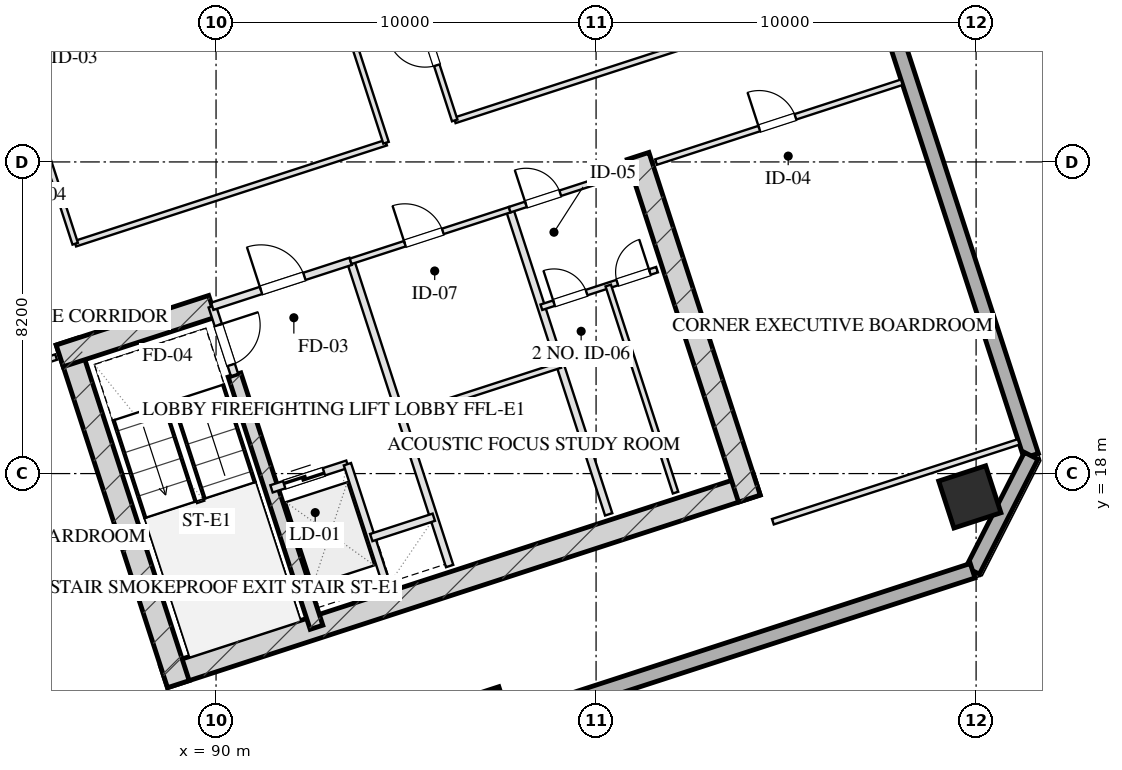
"""IFC4 building model, lengths in metres.
Left out: names, types, materials, properties, quantities, classifications, styles, units other than length and angle.
Written with IfcOpenShell. Run it as: python <this file> out.ifc"""

import sys

from ifc_helpers import new_model, si_unit, direction, frame, frame_2d, origin, origin_2d, place, context, subcontext, project, spatial, rectangle, hollow_rectangle, extrude, element, fill, save


model = new_model("IFC4")
c1 = context("Model", 3, precision=1e-05, world=origin(), true_north=direction((0.0, 1.0)))
c2 = subcontext(c1, "Body", "Model", "MODEL_VIEW")
j1 = project(units=[si_unit("LENGTHUNIT", "METRE"), si_unit("PLANEANGLEUNIT", "RADIAN")], contexts=[c1])
p1 = place(None, origin())
s1 = spatial("IfcSite", under=j1, at=p1, CompositionType="ELEMENT")
p2 = place(p1, origin())
s2 = spatial("IfcBuilding", under=s1, at=p2, CompositionType="ELEMENT")
p3 = place(p2, frame((0.0, 0.0, 166.75)))
s3 = spatial("IfcBuildingStorey", under=s2, at=p3, CompositionType="ELEMENT", Elevation=166.75)
p4 = place(p3, frame((88.63, 12.652, 0.0), z_axis=(0.0, 0.0, 1.0), x_axis=(0.95105714907, 0.309015046886, 0.0)))
e1 = element("IfcWall", 1, at=p4, inside=s3, PredefinedType="SHEAR", context=c2, shape_type="SweptSolid", body=[
    extrude(rectangle(XDim=16.4, YDim=0.6, at=frame_2d((8.2, 0.0))), origin(), (0.0, 0.0, 1.0), 3.45),
])
p5 = place(p3, frame((86.078, 21.475, 0.0), z_axis=(0.0, 0.0, 1.0), x_axis=(0.309017938678, -0.951056209472, 0.0)))
e2 = element("IfcWall", 2, at=p5, inside=s3, PredefinedType="SHEAR", context=c2, shape_type="SweptSolid", body=[
    extrude(rectangle(XDim=9.48, YDim=0.6, at=frame_2d((4.74, 0.0))), origin(), (0.0, 0.0, 1.0), 3.45),
])
p6 = place(p3, frame((101.105, 26.358, 0.0), z_axis=(0.0, 0.0, 1.0), x_axis=(0.309010370028, -0.95105866865, 0.0)))
e3 = element("IfcWall", 3, at=p6, inside=s3, PredefinedType="SHEAR", context=c2, shape_type="SweptSolid", body=[
    extrude(rectangle(XDim=9.48, YDim=0.6, at=frame_2d((4.74, 0.0))), origin(), (0.0, 0.0, 1.0), 3.45),
])
p7 = place(p3, frame((90.486, 20.594, 0.0), z_axis=(0.0, 0.0, 1.0), x_axis=(0.309020428229, -0.951055400562, 0.0)))
e4 = element("IfcWall", 4, at=p7, inside=s3, PredefinedType="SHEAR", context=c2, shape_type="SweptSolid", body=[
    extrude(rectangle(XDim=6.98, YDim=0.35, at=frame_2d((3.49, 0.0))), origin(), (0.0, 0.0, 1.0), 3.45),
])
p8 = place(p3, frame((85.886, 21.097, 0.0), z_axis=(0.0, 0.0, 1.0), x_axis=(0.951068073652, 0.308981422225, 0.0)))
e5 = element("IfcWall", 5, at=p8, inside=s3, PredefinedType="SHEAR", context=c2, shape_type="SweptSolid", body=[
    extrude(rectangle(XDim=4.22, YDim=0.6, at=frame_2d((2.11, 0.0))), origin(), (0.0, 0.0, 1.0), 3.45),
])
p9 = place(p3, frame((109.835, 17.386, 0.0), z_axis=(0.0, 0.0, 1.0), x_axis=(0.951056516295, 0.309016994375, 0.0)))
e6 = element("IfcColumn", 6, at=p9, inside=s3, PredefinedType="COLUMN", context=c2, shape_type="SweptSolid", body=[
    extrude(hollow_rectangle(XDim=1.3, YDim=1.3, WallThickness=0.045, at=origin_2d()), origin(), (0.0, 0.0, 1.0), 3.451),
])
p10 = place(p3, frame((97.185, 11.888, 0.0), z_axis=(0.0, 0.0, 1.0), x_axis=(0.951056516295, 0.309016994375, 0.0)))
e7 = element("IfcColumn", 7, at=p10, inside=s3, PredefinedType="COLUMN", context=c2, shape_type="SweptSolid", body=[
    extrude(hollow_rectangle(XDim=0.8, YDim=0.8, WallThickness=0.028, at=origin_2d()), origin(), (0.0, 0.0, 1.0), 3.451),
])
p11 = place(p3, frame((98.224, 59.173, 0.0), z_axis=(0.0, 0.0, 1.0), x_axis=(0.309014228706, -0.951057414911, 0.0)))
e8 = element("IfcWall", 8, at=p11, inside=s3, PredefinedType="SOLIDWALL", context=c2, shape_type="SweptSolid", body=[
    extrude(rectangle(XDim=42.8, YDim=0.4, at=frame_2d((21.4, 0.0))), origin(), (0.0, 0.0, 1.0), 2.61),
])
p12 = place(p11, frame((17.675, 0.0, 0.75)))
e9 = element("IfcOpeningElement", 9, at=p12, cuts=e8, PredefinedType="OPENING", context=c2, shape_type="SweptSolid", body=[
    extrude(rectangle(XDim=2.25, YDim=1.46, at=frame_2d((1.125, 0.73))), frame((0.0, 0.21, 0.0), z_axis=(0.0, -1.0, 0.0), x_axis=(1.0, 0.0, 0.0)), (0.0, 0.0, 1.0), 0.42),
])
p13 = place(p11, frame((13.875, 0.0, 0.75)))
e10 = element("IfcOpeningElement", 10, at=p13, cuts=e8, PredefinedType="OPENING", context=c2, shape_type="SweptSolid", body=[
    extrude(rectangle(XDim=2.25, YDim=1.46, at=frame_2d((1.125, 0.73))), frame((0.0, 0.21, 0.0), z_axis=(0.0, -1.0, 0.0), x_axis=(1.0, 0.0, 0.0)), (0.0, 0.0, 1.0), 0.42),
])
p14 = place(p11, frame((26.784, 0.0, 0.0)))
e11 = element("IfcOpeningElement", 11, at=p14, cuts=e8, PredefinedType="OPENING", context=c2, shape_type="SweptSolid", body=[
    extrude(rectangle(XDim=1.1, YDim=2.15, at=frame_2d((0.55, 1.075))), frame((0.0, 0.21, 0.0), z_axis=(0.0, -1.0, 0.0), x_axis=(1.0, 0.0, 0.0)), (0.0, 0.0, 1.0), 0.42),
])
p15 = place(p3, frame((111.449, 18.468, 0.0), z_axis=(0.0, 0.0, 1.0), x_axis=(-0.454019523198, -0.890991735402, 0.0)))
e12 = element("IfcWall", 12, at=p15, inside=s3, PredefinedType="SOLIDWALL", context=c2, shape_type="SweptSolid", body=[
    extrude(rectangle(XDim=3.394, YDim=0.4, at=frame_2d((1.697, 0.0))), origin(), (0.0, 0.0, 1.0), 2.61),
])
p16 = place(p3, frame((109.908, 15.444, 0.0), z_axis=(0.0, 0.0, 1.0), x_axis=(-0.951057580055, -0.30901372044, 0.0)))
e13 = element("IfcWall", 13, at=p16, inside=s3, PredefinedType="SOLIDWALL", context=c2, shape_type="SweptSolid", body=[
    extrude(rectangle(XDim=26.4, YDim=0.4, at=frame_2d((13.2, 0.0))), origin(), (0.0, 0.0, 1.0), 2.61),
])
p17 = place(p3, frame((89.899, 22.401, 0.0), z_axis=(0.0, 0.0, 1.0), x_axis=(0.308932062672, -0.951084108086, 0.0)))
e14 = element("IfcWall", 14, at=p17, inside=s3, PredefinedType="PARTITIONING", context=c2, shape_type="SweptSolid", body=[
    extrude(rectangle(XDim=1.9, YDim=0.2, at=frame_2d((0.95, 0.0))), origin(), (0.0, 0.0, 1.0), 3.175),
])
p18 = place(p17, frame((0.52, 0.0, 0.0)))
e15 = element("IfcOpeningElement", 15, at=p18, cuts=e14, PredefinedType="OPENING", context=c2, shape_type="SweptSolid", body=[
    extrude(rectangle(XDim=1.1, YDim=2.05, at=frame_2d((0.55, 1.025))), frame((0.0, 0.11, 0.0), z_axis=(0.0, -1.0, 0.0), x_axis=(1.0, 0.0, 0.0)), (0.0, 0.0, 1.0), 0.22),
])
p19 = place(p3, frame((93.542, 23.585, 0.0), z_axis=(0.0, 0.0, 1.0), x_axis=(0.309042196757, -0.951048327176, 0.0)))
e16 = element("IfcWall", 16, at=p19, inside=s3, PredefinedType="PARTITIONING", context=c2, shape_type="SweptSolid", body=[
    extrude(rectangle(XDim=8.43, YDim=0.2, at=frame_2d((4.215, 0.0))), origin(), (0.0, 0.0, 1.0), 3.175),
])
p20 = place(p3, frame((89.899, 22.401, 0.0), z_axis=(0.0, 0.0, 1.0), x_axis=(0.951046716504, 0.309047153403, 0.0)))
e17 = element("IfcWall", 17, at=p20, inside=s3, PredefinedType="PARTITIONING", context=c2, shape_type="SweptSolid", body=[
    extrude(rectangle(XDim=3.83, YDim=0.2, at=frame_2d((1.915, 0.0))), origin(), (0.0, 0.0, 1.0), 3.175),
])
p21 = place(p20, frame((1.35, 0.0, 0.0)))
e18 = element("IfcOpeningElement", 18, at=p21, cuts=e17, PredefinedType="OPENING", context=c2, shape_type="SweptSolid", body=[
    extrude(rectangle(XDim=1.2, YDim=2.05, at=frame_2d((0.6, 1.025))), frame((0.0, 0.11, 0.0), z_axis=(0.0, -1.0, 0.0), x_axis=(1.0, 0.0, 0.0)), (0.0, 0.0, 1.0), 0.22),
])
p22 = place(p3, frame((91.46, 17.598, 0.0), z_axis=(0.0, 0.0, 1.0), x_axis=(0.951062257173, 0.308999325213, 0.0)))
e19 = element("IfcWall", 19, at=p22, inside=s3, PredefinedType="PARTITIONING", context=c2, shape_type="SweptSolid", body=[
    extrude(rectangle(XDim=2.1, YDim=0.2, at=frame_2d((1.05, 0.0))), origin(), (0.0, 0.0, 1.0), 3.175),
])
p23 = place(p22, frame((0.35, 0.0, 0.0)))
e20 = element("IfcOpeningElement", 20, at=p23, cuts=e19, PredefinedType="OPENING", context=c2, shape_type="SweptSolid", body=[
    extrude(rectangle(XDim=1.1, YDim=2.05, at=frame_2d((0.55, 1.025))), frame((0.0, 0.11, 0.0), z_axis=(0.0, -1.0, 0.0), x_axis=(1.0, 0.0, 0.0)), (0.0, 0.0, 1.0), 0.22),
])
p24 = place(p3, frame((93.457, 18.247, 0.0), z_axis=(0.0, 0.0, 1.0), x_axis=(0.3089935693, -0.951064127245, 0.0)))
e21 = element("IfcWall", 21, at=p24, inside=s3, PredefinedType="PARTITIONING", context=c2, shape_type="SweptSolid", body=[
    extrude(rectangle(XDim=3.7, YDim=0.2, at=frame_2d((1.85, 0.0))), origin(), (0.0, 0.0, 1.0), 3.175),
])
p25 = place(p3, frame((94.084, 16.317, 0.0), z_axis=(0.0, 0.0, 1.0), x_axis=(0.951041328149, 0.309063734775, 0.0)))
e22 = element("IfcWall", 22, at=p25, inside=s3, PredefinedType="PARTITIONING", context=c2, shape_type="SweptSolid", body=[
    extrude(rectangle(XDim=1.73, YDim=0.2, at=frame_2d((0.865, 0.0))), origin(), (0.0, 0.0, 1.0), 3.175),
])
p26 = place(p3, frame((97.727, 24.944, 0.0), z_axis=(0.0, 0.0, 1.0), x_axis=(0.309016001439, -0.951056838919, 0.0)))
e23 = element("IfcWall", 23, at=p26, inside=s3, PredefinedType="PARTITIONING", context=c2, shape_type="SweptSolid", body=[
    extrude(rectangle(XDim=8.43, YDim=0.2, at=frame_2d((4.215, 0.0))), origin(), (0.0, 0.0, 1.0), 3.175),
])
p27 = place(p3, frame((93.542, 23.585, 0.0), z_axis=(0.0, 0.0, 1.0), x_axis=(0.951063829732, 0.308994485023, 0.0)))
e24 = element("IfcWall", 24, at=p27, inside=s3, PredefinedType="PARTITIONING", context=c2, shape_type="SweptSolid", body=[
    extrude(rectangle(XDim=4.4, YDim=0.15, at=frame_2d((2.2, 0.0))), origin(), (0.0, 0.0, 1.0), 3.175),
])
p28 = place(p27, frame((1.5, 0.0, 0.0)))
e25 = element("IfcOpeningElement", 25, at=p28, cuts=e24, PredefinedType="OPENING", context=c2, shape_type="SweptSolid", body=[
    extrude(rectangle(XDim=1.05, YDim=2.05, at=frame_2d((0.525, 1.025))), frame((0.0, 0.085, 0.0), z_axis=(0.0, -1.0, 0.0), x_axis=(1.0, 0.0, 0.0)), (0.0, 0.0, 1.0), 0.17),
])
p29 = place(p3, frame((94.871, 19.495, 0.0), z_axis=(0.0, 0.0, 1.0), x_axis=(0.951042223598, 0.309060979314, 0.0)))
e26 = element("IfcWall", 26, at=p29, inside=s3, PredefinedType="PARTITIONING", context=c2, shape_type="SweptSolid", body=[
    extrude(rectangle(XDim=4.4, YDim=0.15, at=frame_2d((2.2, 0.0))), origin(), (0.0, 0.0, 1.0), 3.175),
])
p30 = place(p3, frame((97.727, 24.944, 0.0), z_axis=(0.0, 0.0, 1.0), x_axis=(0.951036872128, 0.309077446369, 0.0)))
e27 = element("IfcWall", 27, at=p30, inside=s3, PredefinedType="PARTITIONING", context=c2, shape_type="SweptSolid", body=[
    extrude(rectangle(XDim=3.2, YDim=0.15, at=frame_2d((1.6, 0.0))), origin(), (0.0, 0.0, 1.0), 3.175),
])
p31 = place(p30, frame((0.45, 0.0, 0.0)))
e28 = element("IfcOpeningElement", 28, at=p31, cuts=e27, PredefinedType="OPENING", context=c2, shape_type="SweptSolid", body=[
    extrude(rectangle(XDim=0.95, YDim=2.05, at=frame_2d((0.475, 1.025))), frame((0.0, 0.085, 0.0), z_axis=(0.0, -1.0, 0.0), x_axis=(1.0, 0.0, 0.0)), (0.0, 0.0, 1.0), 0.17),
])
p32 = place(p3, frame((98.561, 22.376, 0.0), z_axis=(0.0, 0.0, 1.0), x_axis=(0.95104415986, 0.309055020985, 0.0)))
e29 = element("IfcWall", 29, at=p32, inside=s3, PredefinedType="PARTITIONING", context=c2, shape_type="SweptSolid", body=[
    extrude(rectangle(XDim=3.2, YDim=0.15, at=frame_2d((1.6, 0.0))), origin(), (0.0, 0.0, 1.0), 3.175),
])
p33 = place(p32, frame((0.35, 0.0, 0.0)))
e30 = element("IfcOpeningElement", 30, at=p33, cuts=e29, PredefinedType="OPENING", context=c2, shape_type="SweptSolid", body=[
    extrude(rectangle(XDim=0.9, YDim=2.05, at=frame_2d((0.45, 1.025))), frame((0.0, 0.085, 0.0), z_axis=(0.0, -1.0, 0.0), x_axis=(1.0, 0.0, 0.0)), (0.0, 0.0, 1.0), 0.17),
])
p34 = place(p32, frame((2.1, 0.0, 0.0)))
e31 = element("IfcOpeningElement", 31, at=p34, cuts=e29, PredefinedType="OPENING", context=c2, shape_type="SweptSolid", body=[
    extrude(rectangle(XDim=0.9, YDim=2.05, at=frame_2d((0.45, 1.025))), frame((0.0, 0.085, 0.0), z_axis=(0.0, -1.0, 0.0), x_axis=(1.0, 0.0, 0.0)), (0.0, 0.0, 1.0), 0.17),
])
p35 = place(p3, frame((100.32, 22.948, 0.0), z_axis=(0.0, 0.0, 1.0), x_axis=(0.309035009867, -0.951050662518, 0.0)))
e32 = element("IfcWall", 32, at=p35, inside=s3, PredefinedType="PARTITIONING", context=c2, shape_type="SweptSolid", body=[
    extrude(rectangle(XDim=5.73, YDim=0.15, at=frame_2d((2.865, 0.0))), origin(), (0.0, 0.0, 1.0), 3.175),
])
p36 = place(p3, frame((78.753, 18.78, 0.0), z_axis=(0.0, 0.0, 1.0), x_axis=(0.951060977215, 0.309003264738, 0.0)))
e33 = element("IfcWall", 33, at=p36, inside=s3, PredefinedType="PARTITIONING", context=c2, shape_type="SweptSolid", body=[
    extrude(rectangle(XDim=7.4, YDim=0.15, at=frame_2d((3.7, 0.0))), origin(), (0.0, 0.0, 1.0), 3.175),
])
p37 = place(p36, frame((3.108, 0.0, 0.0)))
e34 = element("IfcOpeningElement", 34, at=p37, cuts=e33, PredefinedType="OPENING", context=c2, shape_type="SweptSolid", body=[
    extrude(rectangle(XDim=1.0, YDim=2.05, at=frame_2d((0.5, 1.025))), frame((0.0, 0.085, 0.0), z_axis=(0.0, -1.0, 0.0), x_axis=(1.0, 0.0, 0.0)), (0.0, 0.0, 1.0), 0.17),
])
p38 = place(p3, frame((104.653, 16.733, 0.0), z_axis=(0.0, 0.0, 1.0), x_axis=(0.951054383043, 0.309023559774, 0.0)))
e35 = element("IfcWall", 35, at=p38, inside=s3, PredefinedType="PARTITIONING", context=c2, shape_type="SweptSolid", body=[
    extrude(rectangle(XDim=6.8, YDim=0.15, at=frame_2d((3.4, 0.0))), origin(), (0.0, 0.0, 1.0), 3.175),
])
p39 = place(p3, frame((101.578, 26.196, 0.0), z_axis=(0.0, 0.0, 1.0), x_axis=(0.951064934653, 0.308991084134, 0.0)))
e36 = element("IfcWall", 36, at=p39, inside=s3, PredefinedType="PARTITIONING", context=c2, shape_type="SweptSolid", body=[
    extrude(rectangle(XDim=6.8, YDim=0.15, at=frame_2d((3.4, 0.0))), origin(), (0.0, 0.0, 1.0), 3.175),
])
p40 = place(p39, frame((2.856, 0.0, 0.0)))
e37 = element("IfcOpeningElement", 37, at=p40, cuts=e36, PredefinedType="OPENING", context=c2, shape_type="SweptSolid", body=[
    extrude(rectangle(XDim=1.0, YDim=2.05, at=frame_2d((0.5, 1.025))), frame((0.0, 0.085, 0.0), z_axis=(0.0, -1.0, 0.0), x_axis=(1.0, 0.0, 0.0)), (0.0, 0.0, 1.0), 0.17),
])
p41 = place(p3, frame((86.294, 24.048, 0.0), z_axis=(0.0, 0.0, 1.0), x_axis=(0.951052008164, 0.309030868631, 0.0)))
e38 = element("IfcWall", 38, at=p41, inside=s3, PredefinedType="PARTITIONING", context=c2, shape_type="SweptSolid", body=[
    extrude(rectangle(XDim=8.6, YDim=0.15, at=frame_2d((4.3, 0.0))), origin(), (0.0, 0.0, 1.0), 3.175),
])
p42 = place(p3, frame((96.28, 27.292, 0.0), z_axis=(0.0, 0.0, 1.0), x_axis=(0.951056999652, 0.309015506751, 0.0)))
e39 = element("IfcWall", 39, at=p42, inside=s3, PredefinedType="PARTITIONING", context=c2, shape_type="SweptSolid", body=[
    extrude(rectangle(XDim=11.5, YDim=0.15, at=frame_2d((5.75, 0.0))), origin(), (0.0, 0.0, 1.0), 3.175),
])
p43 = place(p3, frame((86.294, 24.048, 0.0), z_axis=(0.0, 0.0, 1.0), x_axis=(-0.309004459387, 0.951060589068, 0.0)))
e40 = element("IfcWall", 40, at=p43, inside=s3, PredefinedType="PARTITIONING", context=c2, shape_type="SweptSolid", body=[
    extrude(rectangle(XDim=16.64, YDim=0.15, at=frame_2d((8.32, 0.0))), origin(), (0.0, 0.0, 1.0), 3.175),
])
p44 = place(p43, frame((4.284, 0.0, 0.0)))
e41 = element("IfcOpeningElement", 41, at=p44, cuts=e40, PredefinedType="OPENING", context=c2, shape_type="SweptSolid", body=[
    extrude(rectangle(XDim=1.1, YDim=2.05, at=frame_2d((0.55, 1.025))), frame((0.0, 0.085, 0.0), z_axis=(0.0, -1.0, 0.0), x_axis=(1.0, 0.0, 0.0)), (0.0, 0.0, 1.0), 0.17),
])
p45 = place(p43, frame((12.724, 0.0, 0.0)))
e42 = element("IfcOpeningElement", 42, at=p45, cuts=e40, PredefinedType="OPENING", context=c2, shape_type="SweptSolid", body=[
    extrude(rectangle(XDim=1.1, YDim=2.05, at=frame_2d((0.55, 1.025))), frame((0.0, 0.085, 0.0), z_axis=(0.0, -1.0, 0.0), x_axis=(1.0, 0.0, 0.0)), (0.0, 0.0, 1.0), 0.17),
])
p46 = place(p3, frame((94.473, 26.705, 0.0), z_axis=(0.0, 0.0, 1.0), x_axis=(-0.309022042254, 0.951054876125, 0.0)))
e43 = element("IfcWall", 43, at=p46, inside=s3, PredefinedType="PARTITIONING", context=c2, shape_type="SweptSolid", body=[
    extrude(rectangle(XDim=16.64, YDim=0.15, at=frame_2d((8.32, 0.0))), origin(), (0.0, 0.0, 1.0), 3.175),
])
p47 = place(p3, frame((96.28, 27.292, 0.0), z_axis=(0.0, 0.0, 1.0), x_axis=(-0.309008771245, 0.951059188113, 0.0)))
e44 = element("IfcWall", 44, at=p47, inside=s3, PredefinedType="PARTITIONING", context=c2, shape_type="SweptSolid", body=[
    extrude(rectangle(XDim=16.64, YDim=0.15, at=frame_2d((8.32, 0.0))), origin(), (0.0, 0.0, 1.0), 3.175),
])
p48 = place(p47, frame((1.526, 0.0, 0.0)))
e45 = element("IfcOpeningElement", 45, at=p48, cuts=e44, PredefinedType="OPENING", context=c2, shape_type="SweptSolid", body=[
    extrude(rectangle(XDim=1.0, YDim=2.05, at=frame_2d((0.5, 1.025))), frame((0.0, 0.085, 0.0), z_axis=(0.0, -1.0, 0.0), x_axis=(1.0, 0.0, 0.0)), (0.0, 0.0, 1.0), 0.17),
])
p49 = place(p47, frame((6.026, 0.0, 0.0)))
e46 = element("IfcOpeningElement", 46, at=p49, cuts=e44, PredefinedType="OPENING", context=c2, shape_type="SweptSolid", body=[
    extrude(rectangle(XDim=1.05, YDim=2.05, at=frame_2d((0.525, 1.025))), frame((0.0, 0.085, 0.0), z_axis=(0.0, -1.0, 0.0), x_axis=(1.0, 0.0, 0.0)), (0.0, 0.0, 1.0), 0.17),
])
p50 = place(p47, frame((10.519, 0.0, 0.0)))
e47 = element("IfcOpeningElement", 47, at=p50, cuts=e44, PredefinedType="OPENING", context=c2, shape_type="SweptSolid", body=[
    extrude(rectangle(XDim=1.0, YDim=2.05, at=frame_2d((0.5, 1.025))), frame((0.0, 0.085, 0.0), z_axis=(0.0, -1.0, 0.0), x_axis=(1.0, 0.0, 0.0)), (0.0, 0.0, 1.0), 0.17),
])
p51 = place(p47, frame((14.338, 0.0, 0.0)))
e48 = element("IfcOpeningElement", 48, at=p51, cuts=e44, PredefinedType="OPENING", context=c2, shape_type="SweptSolid", body=[
    extrude(rectangle(XDim=0.85, YDim=2.05, at=frame_2d((0.425, 1.025))), frame((0.0, 0.085, 0.0), z_axis=(0.0, -1.0, 0.0), x_axis=(1.0, 0.0, 0.0)), (0.0, 0.0, 1.0), 0.17),
])
p52 = place(p18, origin())
e49 = element("IfcDoor", 49, at=p52, inside=s3, OperationType="SINGLE_SWING_LEFT", PredefinedType="DOOR", context=c2, shape_type="SweptSolid", body=[
    extrude(rectangle(XDim=1.1, YDim=2.05, at=frame_2d((0.55, 1.025))), frame((0.0, 0.025, 0.0), z_axis=(0.0, -1.0, 0.0), x_axis=(1.0, 0.0, 0.0)), (0.0, 0.0, 1.0), 0.05),
])
fill(e15, e49)
p53 = place(p21, origin())
e50 = element("IfcDoor", 50, at=p53, inside=s3, OperationType="SINGLE_SWING_LEFT", PredefinedType="DOOR", context=c2, shape_type="SweptSolid", body=[
    extrude(rectangle(XDim=1.2, YDim=2.05, at=frame_2d((0.6, 1.025))), frame((0.0, 0.025, 0.0), z_axis=(0.0, -1.0, 0.0), x_axis=(1.0, 0.0, 0.0)), (0.0, 0.0, 1.0), 0.05),
])
fill(e18, e50)
p54 = place(p23, origin())
e51 = element("IfcDoor", 51, at=p54, inside=s3, OperationType="DOUBLE_DOOR_SLIDING", PredefinedType="DOOR", context=c2, shape_type="SweptSolid", body=[
    extrude(rectangle(XDim=1.1, YDim=2.05, at=frame_2d((0.55, 1.025))), frame((0.0, 0.025, 0.0), z_axis=(0.0, -1.0, 0.0), x_axis=(1.0, 0.0, 0.0)), (0.0, 0.0, 1.0), 0.05),
])
fill(e20, e51)
p55 = place(p28, origin())
e52 = element("IfcDoor", 52, at=p55, inside=s3, OperationType="SINGLE_SWING_LEFT", PredefinedType="DOOR", context=c2, shape_type="SweptSolid", body=[
    extrude(rectangle(XDim=1.05, YDim=2.05, at=frame_2d((0.525, 1.025))), frame((0.0, 0.025, 0.0), z_axis=(0.0, -1.0, 0.0), x_axis=(1.0, 0.0, 0.0)), (0.0, 0.0, 1.0), 0.05),
])
fill(e25, e52)
p56 = place(p31, origin())
e53 = element("IfcDoor", 53, at=p56, inside=s3, OperationType="SINGLE_SWING_LEFT", PredefinedType="DOOR", context=c2, shape_type="SweptSolid", body=[
    extrude(rectangle(XDim=0.95, YDim=2.05, at=frame_2d((0.475, 1.025))), frame((0.0, 0.025, 0.0), z_axis=(0.0, -1.0, 0.0), x_axis=(1.0, 0.0, 0.0)), (0.0, 0.0, 1.0), 0.05),
])
fill(e28, e53)
p57 = place(p33, origin())
e54 = element("IfcDoor", 54, at=p57, inside=s3, OperationType="SINGLE_SWING_LEFT", PredefinedType="DOOR", context=c2, shape_type="SweptSolid", body=[
    extrude(rectangle(XDim=0.9, YDim=2.05, at=frame_2d((0.45, 1.025))), frame((0.0, 0.025, 0.0), z_axis=(0.0, -1.0, 0.0), x_axis=(1.0, 0.0, 0.0)), (0.0, 0.0, 1.0), 0.05),
])
fill(e30, e54)
p58 = place(p34, origin())
e55 = element("IfcDoor", 55, at=p58, inside=s3, OperationType="SINGLE_SWING_RIGHT", PredefinedType="DOOR", context=c2, shape_type="SweptSolid", body=[
    extrude(rectangle(XDim=0.9, YDim=2.05, at=frame_2d((0.45, 1.025))), frame((0.0, 0.025, 0.0), z_axis=(0.0, -1.0, 0.0), x_axis=(1.0, 0.0, 0.0)), (0.0, 0.0, 1.0), 0.05),
])
fill(e31, e55)
p59 = place(p40, origin())
e56 = element("IfcDoor", 56, at=p59, inside=s3, OperationType="SINGLE_SWING_LEFT", PredefinedType="DOOR", context=c2, shape_type="SweptSolid", body=[
    extrude(rectangle(XDim=1.0, YDim=2.05, at=frame_2d((0.5, 1.025))), frame((0.0, 0.025, 0.0), z_axis=(0.0, -1.0, 0.0), x_axis=(1.0, 0.0, 0.0)), (0.0, 0.0, 1.0), 0.05),
])
fill(e37, e56)
p60 = place(p48, origin())
e57 = element("IfcDoor", 57, at=p60, inside=s3, OperationType="SINGLE_SWING_RIGHT", PredefinedType="DOOR", context=c2, shape_type="SweptSolid", body=[
    extrude(rectangle(XDim=1.0, YDim=2.05, at=frame_2d((0.5, 1.025))), frame((0.0, 0.025, 0.0), z_axis=(0.0, -1.0, 0.0), x_axis=(1.0, 0.0, 0.0)), (0.0, 0.0, 1.0), 0.05),
])
fill(e45, e57)
save(model, sys.argv[1])
